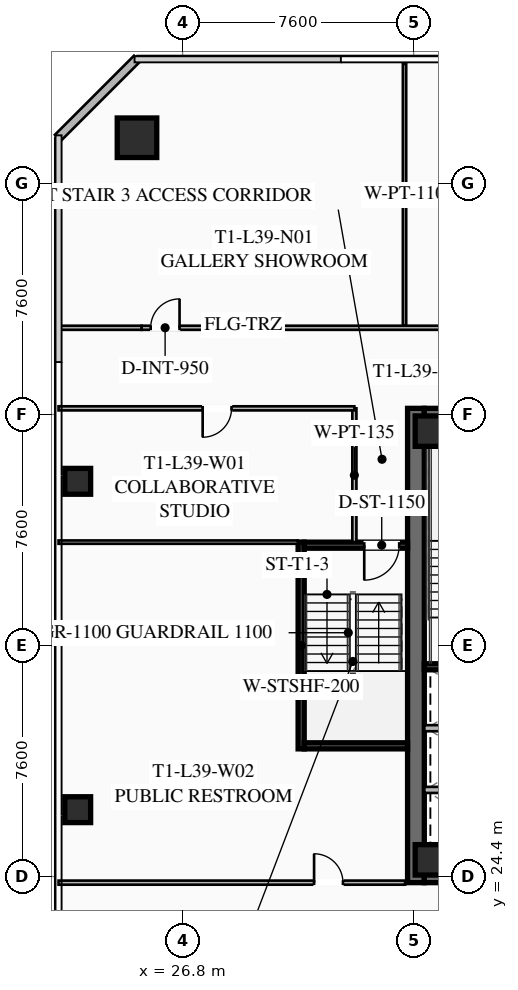
"""IFC4 building model, lengths in metres.
Left out: names, types, materials, properties, quantities, classifications, styles, units other than length and angle.
Written with IfcOpenShell. Run it as: python <this file> out.ifc"""

import sys

from ifc_helpers import new_model, si_unit, direction, frame, frame_2d, origin, origin_2d, place, context, subcontext, project, spatial, rectangle, hollow_rectangle, extrude, element, fill, save


model = new_model("IFC4")
c1 = context("Model", 3, precision=1e-05, world=origin(), true_north=direction((0.0, 1.0)))
c2 = subcontext(c1, "Body", "Model", "MODEL_VIEW")
j1 = project(units=[si_unit("LENGTHUNIT", "METRE"), si_unit("PLANEANGLEUNIT", "RADIAN")], contexts=[c1])
p1 = place(None, origin())
s1 = spatial("IfcSite", under=j1, at=p1, CompositionType="ELEMENT")
p2 = place(p1, origin())
s2 = spatial("IfcBuilding", under=s1, at=p2, CompositionType="ELEMENT")
p3 = place(p2, frame((0.0, 0.0, 146.35)))
s3 = spatial("IfcBuildingStorey", under=s2, at=p3, CompositionType="ELEMENT", Elevation=146.35)
p4 = place(p3, frame((34.475, 24.2, 0.0), z_axis=(0.0, 0.0, 1.0), x_axis=(0.0, 1.0, 0.0)))
e1 = element("IfcWall", 1, at=p4, inside=s3, PredefinedType="SHEAR", context=c2, shape_type="SweptSolid", body=[
    extrude(rectangle(XDim=15.6, YDim=0.55, at=frame_2d((7.8, 0.0))), origin(), (0.0, 0.0, 1.0), 3.55),
])
p5 = place(p3, frame((49.25, 24.475, 0.0), z_axis=(0.0, 0.0, 1.0), x_axis=(-1.0, 0.0, 0.0)))
e2 = element("IfcWall", 2, at=p5, inside=s3, PredefinedType="SHEAR", context=c2, shape_type="SweptSolid", body=[
    extrude(rectangle(XDim=14.5, YDim=0.55, at=frame_2d((7.25, 0.0))), origin(), (0.0, 0.0, 1.0), 3.55),
])
p6 = place(p5, frame((8.95, 0.0, 0.0)))
e3 = element("IfcOpeningElement", 3, at=p6, cuts=e2, PredefinedType="OPENING", context=c2, shape_type="SweptSolid", body=[
    extrude(rectangle(XDim=1.25, YDim=2.25, at=frame_2d((0.625, 1.125))), frame((0.0, 0.285, 0.0), z_axis=(0.0, -1.0, 0.0), x_axis=(1.0, 0.0, 0.0)), (0.0, 0.0, 1.0), 0.57),
])
p7 = place(p5, frame((3.9, 0.0, 0.0)))
e4 = element("IfcOpeningElement", 4, at=p7, cuts=e2, PredefinedType="OPENING", context=c2, shape_type="SweptSolid", body=[
    extrude(rectangle(XDim=1.25, YDim=2.25, at=frame_2d((0.625, 1.125))), frame((0.0, 0.285, 0.0), z_axis=(0.0, -1.0, 0.0), x_axis=(1.0, 0.0, 0.0)), (0.0, 0.0, 1.0), 0.57),
])
p8 = place(p3, frame((34.75, 39.525, 0.0), z_axis=(0.0, 0.0, 1.0), x_axis=(1.0, 0.0, 0.0)))
e5 = element("IfcWall", 5, at=p8, inside=s3, PredefinedType="SHEAR", context=c2, shape_type="SweptSolid", body=[
    extrude(rectangle(XDim=14.5, YDim=0.55, at=frame_2d((7.25, 0.0))), origin(), (0.0, 0.0, 1.0), 3.55),
])
p9 = place(p8, frame((4.3, 0.0, 0.0)))
e6 = element("IfcOpeningElement", 6, at=p9, cuts=e5, PredefinedType="OPENING", context=c2, shape_type="SweptSolid", body=[
    extrude(rectangle(XDim=1.25, YDim=2.25, at=frame_2d((0.625, 1.125))), frame((0.0, 0.285, 0.0), z_axis=(0.0, -1.0, 0.0), x_axis=(1.0, 0.0, 0.0)), (0.0, 0.0, 1.0), 0.57),
])
p10 = place(p8, frame((9.35, 0.0, 0.0)))
e7 = element("IfcOpeningElement", 7, at=p10, cuts=e5, PredefinedType="OPENING", context=c2, shape_type="SweptSolid", body=[
    extrude(rectangle(XDim=1.25, YDim=2.25, at=frame_2d((0.625, 1.125))), frame((0.0, 0.285, 0.0), z_axis=(0.0, -1.0, 0.0), x_axis=(1.0, 0.0, 0.0)), (0.0, 0.0, 1.0), 0.57),
])
for number, where, z_axis, x_axis in (
    (8, (34.95, 24.95, 0.0), (0.0, 0.0, 1.0), (1.0, 0.0, 0.0)),
    (9, (34.95, 39.05, 0.0), (0.0, 0.0, 1.0), (1.0, 0.0, 0.0)),
):
    element("IfcColumn", number, at=place(p3, frame(where, z_axis=z_axis, x_axis=x_axis)), inside=s3, PredefinedType="COLUMN", context=c2, shape_type="SweptSolid", body=[
        extrude(hollow_rectangle(XDim=1.0, YDim=1.0, WallThickness=0.04, at=origin_2d()), origin(), (0.0, 0.0, 1.0), 3.37),
    ])
p11 = place(p3, frame((25.3, 48.7, 0.0), z_axis=(0.0, 0.0, 1.0), x_axis=(1.0, 0.0, 0.0)))
e10 = element("IfcColumn", 10, at=p11, inside=s3, PredefinedType="COLUMN", context=c2, shape_type="SweptSolid", body=[
    extrude(hollow_rectangle(XDim=1.3, YDim=1.3, WallThickness=0.05, at=origin_2d()), origin(), (0.0, 0.0, 1.0), 3.37),
])
for number, where, z_axis, x_axis in (
    (11, (23.35, 37.4, 0.0), (0.0, 0.0, 1.0), (1.0, 0.0, 0.0)),
    (12, (23.35, 26.6, 0.0), (0.0, 0.0, 1.0), (1.0, 0.0, 0.0)),
):
    element("IfcColumn", number, at=place(p3, frame(where, z_axis=z_axis, x_axis=x_axis)), inside=s3, PredefinedType="COLUMN", context=c2, shape_type="SweptSolid", body=[
        extrude(hollow_rectangle(XDim=0.85, YDim=0.85, WallThickness=0.035, at=origin_2d()), origin(), (0.0, 0.0, 1.0), 3.37),
    ])
p12 = place(p3, frame((22.7, 48.7, 0.0), z_axis=(0.0, 0.0, 1.0), x_axis=(0.707106781187, 0.707106781187, 0.0)))
e13 = element("IfcWall", 13, at=p12, inside=s3, PredefinedType="SOLIDWALL", context=c2, shape_type="SweptSolid", body=[
    extrude(rectangle(XDim=3.677, YDim=0.28, at=frame_2d((1.838, 0.0))), origin(), (0.0, 0.0, 1.0), 3.37),
])
for number, where, z_axis, x_axis in (
    (14, (34.75, 31.3, 0.0), (0.0, 0.0, 1.0), (1.0, 0.0, 0.0)),
    (15, (34.75, 38.7, 0.0), (0.0, 0.0, 1.0), (1.0, 0.0, 0.0)),
):
    element("IfcWall", number, at=place(p3, frame(where, z_axis=z_axis, x_axis=x_axis)), inside=s3, PredefinedType="SHEAR", context=c2, shape_type="SweptSolid", body=[
        extrude(rectangle(XDim=3.55, YDim=0.2, at=frame_2d((1.775, 0.0))), origin(), (0.0, 0.0, 1.0), 3.37),
    ])
for number, where, z_axis, x_axis in (
    (16, (34.75, 27.25, 0.0), (0.0, 0.0, 1.0), (1.0, 0.0, 0.0)),
    (17, (34.75, 29.28, 0.0), (0.0, 0.0, 1.0), (1.0, 0.0, 0.0)),
):
    element("IfcWall", number, at=place(p3, frame(where, z_axis=z_axis, x_axis=x_axis)), inside=s3, PredefinedType="SOLIDWALL", context=c2, shape_type="SweptSolid", body=[
        extrude(rectangle(XDim=3.2, YDim=0.2, at=frame_2d((1.6, 0.0))), origin(), (0.0, 0.0, 1.0), 3.37),
    ])
p13 = place(p3, frame((30.7, 28.6, 0.0), z_axis=(0.0, 0.0, 1.0), x_axis=(0.0, 1.0, 0.0)))
e18 = element("IfcWall", 18, at=p13, inside=s3, PredefinedType="SHEAR", context=c2, shape_type="SweptSolid", body=[
    extrude(rectangle(XDim=6.8, YDim=0.2, at=frame_2d((3.4, 0.0))), origin(), (0.0, 0.0, 1.0), 3.37),
])
p14 = place(p3, frame((34.2, 35.3, 0.0), z_axis=(0.0, 0.0, 1.0), x_axis=(-1.0, 0.0, 0.0)))
e19 = element("IfcWall", 19, at=p14, inside=s3, PredefinedType="SHEAR", context=c2, shape_type="SweptSolid", body=[
    extrude(rectangle(XDim=3.4, YDim=0.2, at=frame_2d((1.7, 0.0))), origin(), (0.0, 0.0, 1.0), 3.37),
])
p15 = place(p14, frame((0.275, 0.0, 0.0)))
e20 = element("IfcOpeningElement", 20, at=p15, cuts=e19, PredefinedType="OPENING", context=c2, shape_type="SweptSolid", body=[
    extrude(rectangle(XDim=1.15, YDim=2.2, at=frame_2d((0.575, 1.1))), frame((0.0, 0.11, 0.0), z_axis=(0.0, -1.0, 0.0), x_axis=(1.0, 0.0, 0.0)), (0.0, 0.0, 1.0), 0.22),
])
p16 = place(p3, frame((30.8, 28.7, 0.0), z_axis=(0.0, 0.0, 1.0), x_axis=(1.0, 0.0, 0.0)))
e21 = element("IfcWall", 21, at=p16, inside=s3, PredefinedType="SHEAR", context=c2, shape_type="SweptSolid", body=[
    extrude(rectangle(XDim=3.4, YDim=0.2, at=frame_2d((1.7, 0.0))), origin(), (0.0, 0.0, 1.0), 3.37),
])
p17 = place(p3, frame((32.45, 35.4, 0.0), z_axis=(0.0, 0.0, 1.0), x_axis=(0.0, 1.0, 0.0)))
e22 = element("IfcWall", 22, at=p17, inside=s3, PredefinedType="PARTITIONING", context=c2, shape_type="SweptSolid", body=[
    extrude(rectangle(XDim=4.4, YDim=0.135, at=frame_2d((2.2, 0.0))), origin(), (0.0, 0.0, 1.0), 2.723),
])
p18 = place(p3, frame((25.45, 42.45, 0.0), z_axis=(0.0, 0.0, 1.0), x_axis=(1.0, 0.0, 0.0)))
e23 = element("IfcWall", 23, at=p18, inside=s3, PredefinedType="PARTITIONING", context=c2, shape_type="SweptSolid", body=[
    extrude(rectangle(XDim=33.1, YDim=0.135, at=frame_2d((16.55, 0.0))), origin(), (0.0, 0.0, 1.0), 2.723),
])
p19 = place(p18, frame((0.3, 0.0, 0.0)))
e24 = element("IfcOpeningElement", 24, at=p19, cuts=e23, PredefinedType="OPENING", context=c2, shape_type="SweptSolid", body=[
    extrude(rectangle(XDim=0.95, YDim=2.05, at=frame_2d((0.475, 1.025))), frame((0.0, 0.077, 0.0), z_axis=(0.0, -1.0, 0.0), x_axis=(1.0, 0.0, 0.0)), (0.0, 0.0, 1.0), 0.155),
])
p20 = place(p18, frame((12.315, 0.0, 0.0)))
e25 = element("IfcOpeningElement", 25, at=p20, cuts=e23, PredefinedType="OPENING", context=c2, shape_type="SweptSolid", body=[
    extrude(rectangle(XDim=0.95, YDim=2.05, at=frame_2d((0.475, 1.025))), frame((0.0, 0.077, 0.0), z_axis=(0.0, -1.0, 0.0), x_axis=(1.0, 0.0, 0.0)), (0.0, 0.0, 1.0), 0.155),
])
p21 = place(p18, frame((16.342, 0.0, 0.0)))
e26 = element("IfcOpeningElement", 26, at=p21, cuts=e23, PredefinedType="OPENING", context=c2, shape_type="SweptSolid", body=[
    extrude(rectangle(XDim=0.95, YDim=2.05, at=frame_2d((0.475, 1.025))), frame((0.0, 0.077, 0.0), z_axis=(0.0, -1.0, 0.0), x_axis=(1.0, 0.0, 0.0)), (0.0, 0.0, 1.0), 0.155),
])
p22 = place(p18, frame((31.85, 0.0, 0.0)))
e27 = element("IfcOpeningElement", 27, at=p22, cuts=e23, PredefinedType="OPENING", context=c2, shape_type="SweptSolid", body=[
    extrude(rectangle(XDim=0.95, YDim=2.05, at=frame_2d((0.475, 1.025))), frame((0.0, 0.077, 0.0), z_axis=(0.0, -1.0, 0.0), x_axis=(1.0, 0.0, 0.0)), (0.0, 0.0, 1.0), 0.155),
])
p23 = place(p3, frame((22.72, 42.45, 0.0), z_axis=(0.0, 0.0, 1.0), x_axis=(1.0, 0.0, 0.0)))
e28 = element("IfcWall", 28, at=p23, inside=s3, PredefinedType="PARTITIONING", context=c2, shape_type="SweptSolid", body=[
    extrude(rectangle(XDim=2.73, YDim=0.135, at=frame_2d((1.365, 0.0))), origin(), (0.0, 0.0, 1.0), 2.723),
])
p24 = place(p3, frame((34.1, 42.53, 0.0), z_axis=(0.0, 0.0, 1.0), x_axis=(0.0, 1.0, 0.0)))
e29 = element("IfcWall", 29, at=p24, inside=s3, PredefinedType="PARTITIONING", context=c2, shape_type="SweptSolid", body=[
    extrude(rectangle(XDim=8.6, YDim=0.11, at=frame_2d((4.3, 0.0))), origin(), (0.0, 0.0, 1.0), 2.723),
])
p25 = place(p3, frame((32.45, 39.8, 0.0), z_axis=(0.0, 0.0, 1.0), x_axis=(-1.0, 0.0, 0.0)))
e30 = element("IfcWall", 30, at=p25, inside=s3, PredefinedType="PARTITIONING", context=c2, shape_type="SweptSolid", body=[
    extrude(rectangle(XDim=9.73, YDim=0.135, at=frame_2d((4.865, 0.0))), origin(), (0.0, 0.0, 1.0), 2.723),
])
p26 = place(p25, frame((4.04, 0.0, 0.0)))
e31 = element("IfcOpeningElement", 31, at=p26, cuts=e30, PredefinedType="OPENING", context=c2, shape_type="SweptSolid", body=[
    extrude(rectangle(XDim=0.95, YDim=2.05, at=frame_2d((0.475, 1.025))), frame((0.0, 0.077, 0.0), z_axis=(0.0, -1.0, 0.0), x_axis=(1.0, 0.0, 0.0)), (0.0, 0.0, 1.0), 0.155),
])
p27 = place(p3, frame((22.72, 24.2, 0.0), z_axis=(0.0, 0.0, 1.0), x_axis=(1.0, 0.0, 0.0)))
e32 = element("IfcWall", 32, at=p27, inside=s3, PredefinedType="PARTITIONING", context=c2, shape_type="SweptSolid", body=[
    extrude(rectangle(XDim=11.4, YDim=0.135, at=frame_2d((5.7, 0.0))), origin(), (0.0, 0.0, 1.0), 2.723),
])
p28 = place(p27, frame((8.405, 0.0, 0.0)))
e33 = element("IfcOpeningElement", 33, at=p28, cuts=e32, PredefinedType="OPENING", context=c2, shape_type="SweptSolid", body=[
    extrude(rectangle(XDim=0.95, YDim=2.05, at=frame_2d((0.475, 1.025))), frame((0.0, 0.077, 0.0), z_axis=(0.0, -1.0, 0.0), x_axis=(1.0, 0.0, 0.0)), (0.0, 0.0, 1.0), 0.155),
])
p29 = place(p3, frame((30.6, 35.4, 0.0), z_axis=(0.0, 0.0, 1.0), x_axis=(-1.0, 0.0, 0.0)))
e34 = element("IfcWall", 34, at=p29, inside=s3, PredefinedType="PARTITIONING", context=c2, shape_type="SweptSolid", body=[
    extrude(rectangle(XDim=7.88, YDim=0.11, at=frame_2d((3.94, 0.0))), origin(), (0.0, 0.0, 1.0), 2.723),
])
p30 = place(p15, origin())
e35 = element("IfcDoor", 35, at=p30, inside=s3, OperationType="SINGLE_SWING_RIGHT", PredefinedType="DOOR", context=c2, shape_type="SweptSolid", body=[
    extrude(rectangle(XDim=1.15, YDim=2.2, at=frame_2d((0.575, 1.1))), frame((0.0, 0.025, 0.0), z_axis=(0.0, -1.0, 0.0), x_axis=(1.0, 0.0, 0.0)), (0.0, 0.0, 1.0), 0.05),
])
fill(e20, e35)
p31 = place(p19, origin())
e36 = element("IfcDoor", 36, at=p31, inside=s3, OperationType="SINGLE_SWING_RIGHT", PredefinedType="DOOR", context=c2, shape_type="SweptSolid", body=[
    extrude(rectangle(XDim=0.95, YDim=2.05, at=frame_2d((0.475, 1.025))), frame((0.0, 0.025, 0.0), z_axis=(0.0, -1.0, 0.0), x_axis=(1.0, 0.0, 0.0)), (0.0, 0.0, 1.0), 0.05),
])
fill(e24, e36)
p32 = place(p26, origin())
e37 = element("IfcDoor", 37, at=p32, inside=s3, OperationType="SINGLE_SWING_RIGHT", PredefinedType="DOOR", context=c2, shape_type="SweptSolid", body=[
    extrude(rectangle(XDim=0.95, YDim=2.05, at=frame_2d((0.475, 1.025))), frame((0.0, 0.025, 0.0), z_axis=(0.0, -1.0, 0.0), x_axis=(1.0, 0.0, 0.0)), (0.0, 0.0, 1.0), 0.05),
])
fill(e31, e37)
p33 = place(p28, origin())
e38 = element("IfcDoor", 38, at=p33, inside=s3, OperationType="SINGLE_SWING_LEFT", PredefinedType="DOOR", context=c2, shape_type="SweptSolid", body=[
    extrude(rectangle(XDim=0.95, YDim=2.05, at=frame_2d((0.475, 1.025))), frame((0.0, 0.025, 0.0), z_axis=(0.0, -1.0, 0.0), x_axis=(1.0, 0.0, 0.0)), (0.0, 0.0, 1.0), 0.05),
])
fill(e33, e38)
save(model, sys.argv[1])
